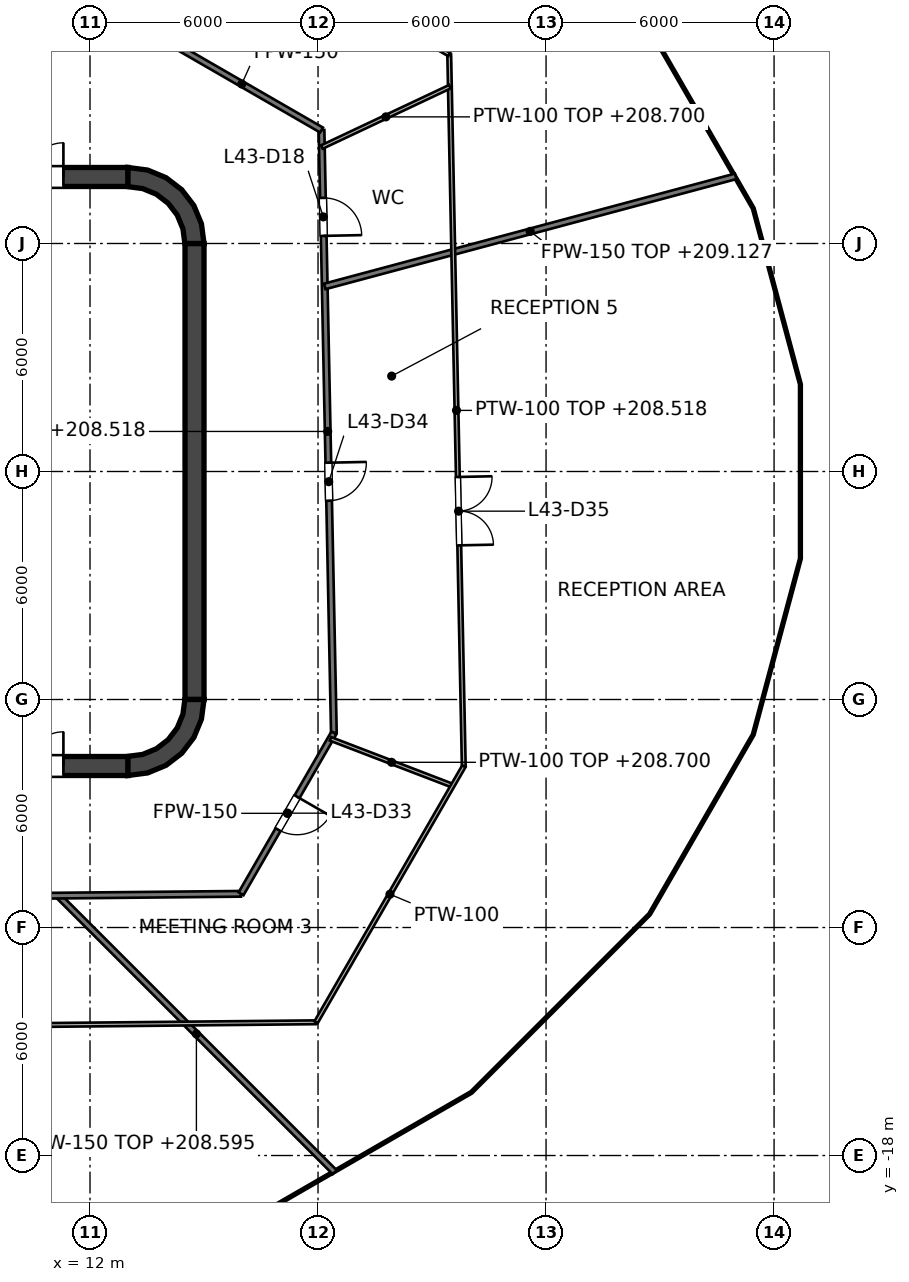
"""IFC4 building model, lengths in metres.
Left out: names, types, materials, properties, quantities, classifications, styles, units other than length and angle.
Written with IfcOpenShell. Run it as: python <this file> out.ifc"""

import sys

from ifc_helpers import new_model, si_unit, direction, frame, frame_2d, origin, place, context, subcontext, project, spatial, polyline, rectangle, outline, extrude, element, fill, save


model = new_model("IFC4")
c1 = context("Model", 3, precision=1e-05, world=origin(), true_north=direction((0.0, 1.0)))
c2 = subcontext(c1, "Body", "Model", "MODEL_VIEW")
j1 = project(units=[si_unit("LENGTHUNIT", "METRE"), si_unit("PLANEANGLEUNIT", "RADIAN")], contexts=[c1])
p1 = place(None, origin())
s1 = spatial("IfcSite", under=j1, at=p1, CompositionType="ELEMENT")
p2 = place(p1, origin())
s2 = spatial("IfcBuilding", under=s1, at=p2, CompositionType="ELEMENT")
p3 = place(p2, frame((0.0, 0.0, 203.0)))
s3 = spatial("IfcBuildingStorey", under=s2, at=p3, CompositionType="ELEMENT", Elevation=203.0)
p4 = place(p3, frame((-13.0, 7.75, 0.0), z_axis=(0.0, 0.0, 1.0), x_axis=(1.0, 0.0, 0.0)))
e1 = element("IfcWall", 1, at=p4, inside=s3, PredefinedType="SHEAR", context=c2, shape_type="SweptSolid", body=[
    extrude(rectangle(XDim=26.0, YDim=0.5, at=frame_2d((13.0, 0.0))), origin(), (0.0, 0.0, 1.0), 6.45),
])
p5 = place(p4, frame((1.7, 0.0, 0.0)))
e2 = element("IfcOpeningElement", 2, at=p5, cuts=e1, PredefinedType="OPENING", context=c2, shape_type="SweptSolid", body=[
    extrude(rectangle(XDim=1.8, YDim=2.1, at=frame_2d((0.9, 1.05))), frame((0.0, 0.25, 0.0), z_axis=(0.0, -1.0, 0.0), x_axis=(1.0, 0.0, 0.0)), (0.0, 0.0, 1.0), 0.5),
])
p6 = place(p4, frame((22.5, 0.0, 0.0)))
e3 = element("IfcOpeningElement", 3, at=p6, cuts=e1, PredefinedType="OPENING", context=c2, shape_type="SweptSolid", body=[
    extrude(rectangle(XDim=1.8, YDim=2.1, at=frame_2d((0.9, 1.05))), frame((0.0, 0.25, 0.0), z_axis=(0.0, -1.0, 0.0), x_axis=(1.0, 0.0, 0.0)), (0.0, 0.0, 1.0), 0.5),
])
p7 = place(p3, frame((-13.0, -7.75, 0.0), z_axis=(0.0, 0.0, 1.0), x_axis=(1.0, 0.0, 0.0)))
e4 = element("IfcWall", 4, at=p7, inside=s3, PredefinedType="SHEAR", context=c2, shape_type="SweptSolid", body=[
    extrude(rectangle(XDim=26.0, YDim=0.5, at=frame_2d((13.0, 0.0))), origin(), (0.0, 0.0, 1.0), 6.45),
])
p8 = place(p7, frame((1.7, 0.0, 0.0)))
e5 = element("IfcOpeningElement", 5, at=p8, cuts=e4, PredefinedType="OPENING", context=c2, shape_type="SweptSolid", body=[
    extrude(rectangle(XDim=1.8, YDim=2.1, at=frame_2d((0.9, 1.05))), frame((0.0, 0.25, 0.0), z_axis=(0.0, -1.0, 0.0), x_axis=(1.0, 0.0, 0.0)), (0.0, 0.0, 1.0), 0.5),
])
p9 = place(p7, frame((22.5, 0.0, 0.0)))
e6 = element("IfcOpeningElement", 6, at=p9, cuts=e4, PredefinedType="OPENING", context=c2, shape_type="SweptSolid", body=[
    extrude(rectangle(XDim=1.8, YDim=2.1, at=frame_2d((0.9, 1.05))), frame((0.0, 0.25, 0.0), z_axis=(0.0, -1.0, 0.0), x_axis=(1.0, 0.0, 0.0)), (0.0, 0.0, 1.0), 0.5),
])
p10 = place(p3, frame((14.75, -6.0, 0.0), z_axis=(0.0, 0.0, 1.0), x_axis=(0.0, 1.0, 0.0)))
e7 = element("IfcWall", 7, at=p10, inside=s3, PredefinedType="SHEAR", context=c2, shape_type="SweptSolid", body=[
    extrude(rectangle(XDim=12.0, YDim=0.5, at=frame_2d((6.0, 0.0))), origin(), (0.0, 0.0, 1.0), 6.45),
])
p11 = place(p3, origin())
e8 = element("IfcWall", 8, at=p11, inside=s3, PredefinedType="SHEAR", context=c2, shape_type="SweptSolid", body=[
    extrude(outline(polyline([(13.0, 8.0), (13.0, 7.496), (13.387, 7.445), (13.748, 7.295), (14.058, 7.058), (14.295, 6.748), (14.445, 6.387), (14.496, 6.0), (15.0, 6.0), (14.932, 6.518), (14.732, 7.0), (14.414, 7.414), (14.0, 7.732), (13.518, 7.932), (13.0, 8.0)])), origin(), (0.0, 0.0, 1.0), 6.45),
])
e9 = element("IfcWall", 9, at=p11, inside=s3, PredefinedType="SHEAR", context=c2, shape_type="SweptSolid", body=[
    extrude(outline(polyline([(15.0, -6.0), (14.496, -6.0), (14.445, -6.387), (14.295, -6.748), (14.058, -7.058), (13.748, -7.295), (13.387, -7.445), (13.0, -7.496), (13.0, -8.0), (13.518, -7.932), (14.0, -7.732), (14.414, -7.414), (14.732, -7.0), (14.932, -6.518), (15.0, -6.0)])), origin(), (0.0, 0.0, 1.0), 6.45),
])
p12 = place(p3, frame((11.8, -7.5, 0.0), z_axis=(0.0, 0.0, 1.0), x_axis=(0.0, 1.0, 0.0)))
e10 = element("IfcWall", 10, at=p12, inside=s3, PredefinedType="SOLIDWALL", context=c2, shape_type="SweptSolid", body=[
    extrude(rectangle(XDim=15.0, YDim=0.4, at=frame_2d((7.5, 0.0))), origin(), (0.0, 0.0, 1.0), 5.7),
])
p13 = place(p12, frame((11.3, 0.0, 0.0)))
e11 = element("IfcOpeningElement", 11, at=p13, cuts=e10, PredefinedType="OPENING", context=c2, shape_type="SweptSolid", body=[
    extrude(rectangle(XDim=1.1, YDim=2.1, at=frame_2d((0.55, 1.05))), frame((0.0, 0.2, 0.0), z_axis=(0.0, -1.0, 0.0), x_axis=(1.0, 0.0, 0.0)), (0.0, 0.0, 1.0), 0.4),
])
p14 = place(p12, frame((8.4, 0.0, 0.0)))
e12 = element("IfcOpeningElement", 12, at=p14, cuts=e10, PredefinedType="OPENING", context=c2, shape_type="SweptSolid", body=[
    extrude(rectangle(XDim=1.1, YDim=2.1, at=frame_2d((0.55, 1.05))), frame((0.0, 0.2, 0.0), z_axis=(0.0, -1.0, 0.0), x_axis=(1.0, 0.0, 0.0)), (0.0, 0.0, 1.0), 0.4),
])
p15 = place(p12, frame((5.5, 0.0, 0.0)))
e13 = element("IfcOpeningElement", 13, at=p15, cuts=e10, PredefinedType="OPENING", context=c2, shape_type="SweptSolid", body=[
    extrude(rectangle(XDim=1.1, YDim=2.1, at=frame_2d((0.55, 1.05))), frame((0.0, 0.2, 0.0), z_axis=(0.0, -1.0, 0.0), x_axis=(1.0, 0.0, 0.0)), (0.0, 0.0, 1.0), 0.4),
])
p16 = place(p12, frame((2.6, 0.0, 0.0)))
e14 = element("IfcOpeningElement", 14, at=p16, cuts=e10, PredefinedType="OPENING", context=c2, shape_type="SweptSolid", body=[
    extrude(rectangle(XDim=1.1, YDim=2.1, at=frame_2d((0.55, 1.05))), frame((0.0, 0.2, 0.0), z_axis=(0.0, -1.0, 0.0), x_axis=(1.0, 0.0, 0.0)), (0.0, 0.0, 1.0), 0.4),
])
p17 = place(p12, frame((13.697, 0.0, 0.0)))
e15 = element("IfcOpeningElement", 15, at=p17, cuts=e10, PredefinedType="OPENING", context=c2, shape_type="SweptSolid", body=[
    extrude(rectangle(XDim=0.9, YDim=2.1, at=frame_2d((0.45, 1.05))), frame((0.0, 0.2, 0.0), z_axis=(0.0, -1.0, 0.0), x_axis=(1.0, 0.0, 0.0)), (0.0, 0.0, 1.0), 0.4),
])
p18 = place(p12, frame((0.403, 0.0, 0.0)))
e16 = element("IfcOpeningElement", 16, at=p18, cuts=e10, PredefinedType="OPENING", context=c2, shape_type="SweptSolid", body=[
    extrude(rectangle(XDim=0.9, YDim=2.1, at=frame_2d((0.45, 1.05))), frame((0.0, 0.2, 0.0), z_axis=(0.0, -1.0, 0.0), x_axis=(1.0, 0.0, 0.0)), (0.0, 0.0, 1.0), 0.4),
])
e17 = element("IfcWall", 17, at=p11, inside=s3, PredefinedType="SOLIDWALL", context=c2, shape_type="SweptSolid", body=[
    extrude(outline(polyline([(12.0, -5.675), (12.0, -5.925), (14.25, -5.925), (14.5, -5.925), (14.5, -5.675), (14.5, -3.025), (14.5, -2.775), (14.5, -0.125), (14.5, 0.125), (14.5, 2.775), (14.5, 3.025), (14.5, 5.675), (14.5, 5.925), (14.25, 5.925), (12.0, 5.925), (12.0, 5.675), (14.25, 5.675), (14.25, 3.025), (12.0, 3.025), (12.0, 2.775), (14.25, 2.775), (14.25, 0.125), (12.0, 0.125), (12.0, -0.125), (14.25, -0.125), (14.25, -2.775), (12.0, -2.775), (12.0, -3.025), (14.25, -3.025), (14.25, -5.675), (12.0, -5.675)])), origin(), (0.0, 0.0, 1.0), 5.7),
])
p19 = place(p3, frame((18.092, 8.986, 0.0), z_axis=(0.0, 0.0, 1.0), x_axis=(0.020463865079, -0.999790593187, 0.0)))
e18 = element("IfcWall", 18, at=p19, inside=s3, PredefinedType="PARTITIONING", context=c2, shape_type="SweptSolid", body=[
    extrude(rectangle(XDim=15.867, YDim=0.15, at=frame_2d((7.934, 0.0))), origin(), (0.0, 0.0, 1.0), 5.518),
])
p20 = place(p19, frame((1.787, 0.0, 0.0)))
e19 = element("IfcOpeningElement", 19, at=p20, cuts=e18, PredefinedType="OPENING", context=c2, shape_type="SweptSolid", body=[
    extrude(rectangle(XDim=1.0, YDim=2.1, at=frame_2d((0.5, 1.05))), frame((0.0, 0.075, 0.0), z_axis=(0.0, -1.0, 0.0), x_axis=(1.0, 0.0, 0.0)), (0.0, 0.0, 1.0), 0.15),
])
p21 = place(p19, frame((8.756, 0.0, 0.0)))
e20 = element("IfcOpeningElement", 20, at=p21, cuts=e18, PredefinedType="OPENING", context=c2, shape_type="SweptSolid", body=[
    extrude(rectangle(XDim=1.0, YDim=2.1, at=frame_2d((0.5, 1.05))), frame((0.0, 0.075, 0.0), z_axis=(0.0, -1.0, 0.0), x_axis=(1.0, 0.0, 0.0)), (0.0, 0.0, 1.0), 0.15),
])
p22 = place(p3, frame((11.161, -11.161, 0.0), z_axis=(0.0, 0.0, 1.0), x_axis=(0.707106781187, -0.707106781187, 0.0)))
e21 = element("IfcWall", 21, at=p22, inside=s3, PredefinedType="PARTITIONING", context=c2, shape_type="SweptSolid", body=[
    extrude(rectangle(XDim=10.291, YDim=0.15, at=frame_2d((5.146, 0.0))), origin(), (0.0, 0.0, 1.0), 5.595),
])
p23 = place(p3, frame((13.895, 11.409, 0.0), z_axis=(0.0, 0.0, 1.0), x_axis=(0.866017793092, -0.500013181875, 0.0)))
e22 = element("IfcWall", 22, at=p23, inside=s3, PredefinedType="PARTITIONING", context=c2, shape_type="SweptSolid", body=[
    extrude(rectangle(XDim=4.846, YDim=0.15, at=frame_2d((2.423, 0.0))), origin(), (0.0, 0.0, 1.0), 5.527),
])
p24 = place(p3, frame((-13.66, -11.407, 0.0), z_axis=(0.0, 0.0, 1.0), x_axis=(0.999950890236, 0.009910454857, 0.0)))
e23 = element("IfcWall", 23, at=p24, inside=s3, PredefinedType="PARTITIONING", context=c2, shape_type="SweptSolid", body=[
    extrude(rectangle(XDim=29.635, YDim=0.15, at=frame_2d((14.818, 0.0))), origin(), (0.0, 0.0, 1.0), 5.527),
])
p25 = place(p24, frame((4.817, 0.0, 0.0)))
e24 = element("IfcOpeningElement", 24, at=p25, cuts=e23, PredefinedType="OPENING", context=c2, shape_type="SweptSolid", body=[
    extrude(rectangle(XDim=1.0, YDim=2.1, at=frame_2d((0.5, 1.05))), frame((0.0, 0.075, 0.0), z_axis=(0.0, -1.0, 0.0), x_axis=(1.0, 0.0, 0.0)), (0.0, 0.0, 1.0), 0.15),
])
p26 = place(p24, frame((14.217, 0.0, 0.0)))
e25 = element("IfcOpeningElement", 25, at=p26, cuts=e23, PredefinedType="OPENING", context=c2, shape_type="SweptSolid", body=[
    extrude(rectangle(XDim=1.0, YDim=2.1, at=frame_2d((0.5, 1.05))), frame((0.0, 0.075, 0.0), z_axis=(0.0, -1.0, 0.0), x_axis=(1.0, 0.0, 0.0)), (0.0, 0.0, 1.0), 0.15),
])
p27 = place(p24, frame((19.582, 0.0, 0.0)))
e26 = element("IfcOpeningElement", 26, at=p27, cuts=e23, PredefinedType="OPENING", context=c2, shape_type="SweptSolid", body=[
    extrude(rectangle(XDim=1.0, YDim=2.1, at=frame_2d((0.5, 1.05))), frame((0.0, 0.075, 0.0), z_axis=(0.0, -1.0, 0.0), x_axis=(1.0, 0.0, 0.0)), (0.0, 0.0, 1.0), 0.15),
])
p28 = place(p3, frame((-15.974, 11.113, 0.0), z_axis=(0.0, 0.0, 1.0), x_axis=(0.999950853314, 0.009914179568, 0.0)))
e27 = element("IfcWall", 27, at=p28, inside=s3, PredefinedType="PARTITIONING", context=c2, shape_type="SweptSolid", body=[
    extrude(rectangle(XDim=29.871, YDim=0.15, at=frame_2d((14.935, 0.0))), origin(), (0.0, 0.0, 1.0), 5.527),
])
p29 = place(p28, frame((23.655, 0.0, 0.0)))
e28 = element("IfcOpeningElement", 28, at=p29, cuts=e27, PredefinedType="OPENING", context=c2, shape_type="SweptSolid", body=[
    extrude(rectangle(XDim=1.0, YDim=2.1, at=frame_2d((0.5, 1.05))), frame((0.0, 0.075, 0.0), z_axis=(0.0, -1.0, 0.0), x_axis=(1.0, 0.0, 0.0)), (0.0, 0.0, 1.0), 0.15),
])
p30 = place(p28, frame((16.707, 0.0, 0.0)))
e29 = element("IfcOpeningElement", 29, at=p30, cuts=e27, PredefinedType="OPENING", context=c2, shape_type="SweptSolid", body=[
    extrude(rectangle(XDim=1.0, YDim=2.1, at=frame_2d((0.5, 1.05))), frame((0.0, 0.075, 0.0), z_axis=(0.0, -1.0, 0.0), x_axis=(1.0, 0.0, 0.0)), (0.0, 0.0, 1.0), 0.15),
])
p31 = place(p28, frame((13.027, 0.0, 0.0)))
e30 = element("IfcOpeningElement", 30, at=p31, cuts=e27, PredefinedType="OPENING", context=c2, shape_type="SweptSolid", body=[
    extrude(rectangle(XDim=1.0, YDim=2.1, at=frame_2d((0.5, 1.05))), frame((0.0, 0.075, 0.0), z_axis=(0.0, -1.0, 0.0), x_axis=(1.0, 0.0, 0.0)), (0.0, 0.0, 1.0), 0.15),
])
p32 = place(p28, frame((6.011, 0.0, 0.0)))
e31 = element("IfcOpeningElement", 31, at=p32, cuts=e27, PredefinedType="OPENING", context=c2, shape_type="SweptSolid", body=[
    extrude(rectangle(XDim=1.0, YDim=2.1, at=frame_2d((0.5, 1.05))), frame((0.0, 0.075, 0.0), z_axis=(0.0, -1.0, 0.0), x_axis=(1.0, 0.0, 0.0)), (0.0, 0.0, 1.0), 0.15),
])
p33 = place(p3, frame((18.177, 4.87, 0.0), z_axis=(0.0, 0.0, 1.0), x_axis=(0.965933448556, 0.258790596738, 0.0)))
e32 = element("IfcWall", 32, at=p33, inside=s3, PredefinedType="PARTITIONING", context=c2, shape_type="SweptSolid", body=[
    extrude(rectangle(XDim=11.193, YDim=0.15, at=frame_2d((5.597, 0.0))), origin(), (0.0, 0.0, 1.0), 6.127),
])
p34 = place(p3, frame((15.974, -11.113, 0.0), z_axis=(0.0, 0.0, 1.0), x_axis=(0.499795925742, 0.866143194057, 0.0)))
e33 = element("IfcWall", 33, at=p34, inside=s3, PredefinedType="PARTITIONING", context=c2, shape_type="SweptSolid", body=[
    extrude(rectangle(XDim=4.89, YDim=0.15, at=frame_2d((2.445, 0.0))), origin(), (0.0, 0.0, 1.0), 5.527),
])
p35 = place(p34, frame((1.95, 0.0, 0.0)))
e34 = element("IfcOpeningElement", 34, at=p35, cuts=e33, PredefinedType="OPENING", context=c2, shape_type="SweptSolid", body=[
    extrude(rectangle(XDim=1.0, YDim=2.1, at=frame_2d((0.5, 1.05))), frame((0.0, 0.075, 0.0), z_axis=(0.0, -1.0, 0.0), x_axis=(1.0, 0.0, 0.0)), (0.0, 0.0, 1.0), 0.15),
])
p36 = place(p3, frame((21.452, 10.972, 0.0), z_axis=(0.0, 0.0, 1.0), x_axis=(0.020449379556, -0.999790889574, 0.0)))
e35 = element("IfcWall", 35, at=p36, inside=s3, PredefinedType="PARTITIONING", context=c2, shape_type="SweptSolid", body=[
    extrude(rectangle(XDim=18.732, YDim=0.1, at=frame_2d((9.366, 0.0))), origin(), (0.0, 0.0, 1.0), 5.518),
])
p37 = place(p36, frame((11.118, 0.0, 0.0)))
e36 = element("IfcOpeningElement", 36, at=p37, cuts=e35, PredefinedType="OPENING", context=c2, shape_type="SweptSolid", body=[
    extrude(rectangle(XDim=1.8, YDim=2.1, at=frame_2d((0.9, 1.05))), frame((0.0, 0.05, 0.0), z_axis=(0.0, -1.0, 0.0), x_axis=(1.0, 0.0, 0.0)), (0.0, 0.0, 1.0), 0.1),
])
p38 = place(p3, frame((14.79, 14.818, 0.0), z_axis=(0.0, 0.0, 1.0), x_axis=(0.866027558591, -0.499996267748, 0.0)))
e37 = element("IfcWall", 37, at=p38, inside=s3, PredefinedType="PARTITIONING", context=c2, shape_type="SweptSolid", body=[
    extrude(rectangle(XDim=7.692, YDim=0.1, at=frame_2d((3.846, 0.0))), origin(), (0.0, 0.0, 1.0), 5.527),
])
p39 = place(p3, frame((18.328, -7.036, 0.0), z_axis=(0.0, 0.0, 1.0), x_axis=(0.933641391497, -0.358209089894, 0.0)))
e38 = element("IfcWall", 38, at=p39, inside=s3, PredefinedType="PARTITIONING", context=c2, shape_type="SweptSolid", body=[
    extrude(rectangle(XDim=3.443, YDim=0.1, at=frame_2d((1.721, 0.0))), origin(), (0.0, 0.0, 1.0), 5.7),
])
p40 = place(p3, frame((-14.32, -14.814, 0.0), z_axis=(0.0, 0.0, 1.0), x_axis=(0.999950809916, 0.009918555737, 0.0)))
e39 = element("IfcWall", 39, at=p40, inside=s3, PredefinedType="PARTITIONING", context=c2, shape_type="SweptSolid", body=[
    extrude(rectangle(XDim=32.27, YDim=0.1, at=frame_2d((16.135, 0.0))), origin(), (0.0, 0.0, 1.0), 5.527),
])
p41 = place(p40, frame((4.239, 0.0, 0.0)))
e40 = element("IfcOpeningElement", 40, at=p41, cuts=e39, PredefinedType="OPENING", context=c2, shape_type="SweptSolid", body=[
    extrude(rectangle(XDim=1.8, YDim=2.1, at=frame_2d((0.9, 1.05))), frame((0.0, 0.05, 0.0), z_axis=(0.0, -1.0, 0.0), x_axis=(1.0, 0.0, 0.0)), (0.0, 0.0, 1.0), 0.1),
])
p42 = place(p40, frame((21.845, 0.0, 0.0)))
e41 = element("IfcOpeningElement", 41, at=p42, cuts=e39, PredefinedType="OPENING", context=c2, shape_type="SweptSolid", body=[
    extrude(rectangle(XDim=1.8, YDim=2.1, at=frame_2d((0.9, 1.05))), frame((0.0, 0.05, 0.0), z_axis=(0.0, -1.0, 0.0), x_axis=(1.0, 0.0, 0.0)), (0.0, 0.0, 1.0), 0.1),
])
p43 = place(p3, frame((18.101, 8.538, 0.0), z_axis=(0.0, 0.0, 1.0), x_axis=(0.904509384474, 0.426453717769, 0.0)))
e42 = element("IfcWall", 42, at=p43, inside=s3, PredefinedType="PARTITIONING", context=c2, shape_type="SweptSolid", body=[
    extrude(rectangle(XDim=3.723, YDim=0.1, at=frame_2d((1.862, 0.0))), origin(), (0.0, 0.0, 1.0), 5.7),
])
p44 = place(p3, frame((17.948, -14.494, 0.0), z_axis=(0.0, 0.0, 1.0), x_axis=(0.49994610202, 0.866056519561, 0.0)))
e43 = element("IfcWall", 43, at=p44, inside=s3, PredefinedType="PARTITIONING", context=c2, shape_type="SweptSolid", body=[
    extrude(rectangle(XDim=7.78, YDim=0.1, at=frame_2d((3.89, 0.0))), origin(), (0.0, 0.0, 1.0), 5.527),
])
p45 = place(p13, origin())
e44 = element("IfcDoor", 44, at=p45, inside=s3, OperationType="DOUBLE_DOOR_SLIDING", PredefinedType="DOOR", context=c2, shape_type="SweptSolid", body=[
    extrude(rectangle(XDim=1.1, YDim=2.1, at=frame_2d((0.55, 1.05))), frame((0.0, 0.025, 0.0), z_axis=(0.0, -1.0, 0.0), x_axis=(1.0, 0.0, 0.0)), (0.0, 0.0, 1.0), 0.05),
])
fill(e11, e44)
p46 = place(p14, origin())
e45 = element("IfcDoor", 45, at=p46, inside=s3, OperationType="DOUBLE_DOOR_SLIDING", PredefinedType="DOOR", context=c2, shape_type="SweptSolid", body=[
    extrude(rectangle(XDim=1.1, YDim=2.1, at=frame_2d((0.55, 1.05))), frame((0.0, 0.025, 0.0), z_axis=(0.0, -1.0, 0.0), x_axis=(1.0, 0.0, 0.0)), (0.0, 0.0, 1.0), 0.05),
])
fill(e12, e45)
p47 = place(p15, origin())
e46 = element("IfcDoor", 46, at=p47, inside=s3, OperationType="DOUBLE_DOOR_SLIDING", PredefinedType="DOOR", context=c2, shape_type="SweptSolid", body=[
    extrude(rectangle(XDim=1.1, YDim=2.1, at=frame_2d((0.55, 1.05))), frame((0.0, 0.025, 0.0), z_axis=(0.0, -1.0, 0.0), x_axis=(1.0, 0.0, 0.0)), (0.0, 0.0, 1.0), 0.05),
])
fill(e13, e46)
p48 = place(p16, origin())
e47 = element("IfcDoor", 47, at=p48, inside=s3, OperationType="DOUBLE_DOOR_SLIDING", PredefinedType="DOOR", context=c2, shape_type="SweptSolid", body=[
    extrude(rectangle(XDim=1.1, YDim=2.1, at=frame_2d((0.55, 1.05))), frame((0.0, 0.025, 0.0), z_axis=(0.0, -1.0, 0.0), x_axis=(1.0, 0.0, 0.0)), (0.0, 0.0, 1.0), 0.05),
])
fill(e14, e47)
p49 = place(p17, origin())
e48 = element("IfcDoor", 48, at=p49, inside=s3, OperationType="SINGLE_SWING_RIGHT", PredefinedType="DOOR", context=c2, shape_type="SweptSolid", body=[
    extrude(rectangle(XDim=0.9, YDim=2.1, at=frame_2d((0.45, 1.05))), frame((0.0, 0.025, 0.0), z_axis=(0.0, -1.0, 0.0), x_axis=(1.0, 0.0, 0.0)), (0.0, 0.0, 1.0), 0.05),
])
fill(e15, e48)
p50 = place(p18, origin())
e49 = element("IfcDoor", 49, at=p50, inside=s3, OperationType="SINGLE_SWING_RIGHT", PredefinedType="DOOR", context=c2, shape_type="SweptSolid", body=[
    extrude(rectangle(XDim=0.9, YDim=2.1, at=frame_2d((0.45, 1.05))), frame((0.0, 0.025, 0.0), z_axis=(0.0, -1.0, 0.0), x_axis=(1.0, 0.0, 0.0)), (0.0, 0.0, 1.0), 0.05),
])
fill(e16, e49)
p51 = place(p6, origin())
e50 = element("IfcDoor", 50, at=p51, inside=s3, OperationType="DOUBLE_DOOR_SINGLE_SWING", PredefinedType="DOOR", context=c2, shape_type="SweptSolid", body=[
    extrude(rectangle(XDim=1.8, YDim=2.1, at=frame_2d((0.9, 1.05))), frame((0.0, 0.025, 0.0), z_axis=(0.0, -1.0, 0.0), x_axis=(1.0, 0.0, 0.0)), (0.0, 0.0, 1.0), 0.05),
])
fill(e3, e50)
p52 = place(p9, origin())
e51 = element("IfcDoor", 51, at=p52, inside=s3, OperationType="DOUBLE_DOOR_SINGLE_SWING", PredefinedType="DOOR", context=c2, shape_type="SweptSolid", body=[
    extrude(rectangle(XDim=1.8, YDim=2.1, at=frame_2d((0.9, 1.05))), frame((0.0, 0.025, 0.0), z_axis=(0.0, -1.0, 0.0), x_axis=(1.0, 0.0, 0.0)), (0.0, 0.0, 1.0), 0.05),
])
fill(e6, e51)
p53 = place(p20, origin())
e52 = element("IfcDoor", 52, at=p53, inside=s3, OperationType="SINGLE_SWING_RIGHT", PredefinedType="DOOR", context=c2, shape_type="SweptSolid", body=[
    extrude(rectangle(XDim=1.0, YDim=2.1, at=frame_2d((0.5, 1.05))), frame((0.0, 0.025, 0.0), z_axis=(0.0, -1.0, 0.0), x_axis=(1.0, 0.0, 0.0)), (0.0, 0.0, 1.0), 0.05),
])
fill(e19, e52)
p54 = place(p35, origin())
e53 = element("IfcDoor", 53, at=p54, inside=s3, OperationType="SINGLE_SWING_RIGHT", PredefinedType="DOOR", context=c2, shape_type="SweptSolid", body=[
    extrude(rectangle(XDim=1.0, YDim=2.1, at=frame_2d((0.5, 1.05))), frame((0.0, 0.025, 0.0), z_axis=(0.0, -1.0, 0.0), x_axis=(1.0, 0.0, 0.0)), (0.0, 0.0, 1.0), 0.05),
])
fill(e34, e53)
p55 = place(p21, origin())
e54 = element("IfcDoor", 54, at=p55, inside=s3, OperationType="SINGLE_SWING_LEFT", PredefinedType="DOOR", context=c2, shape_type="SweptSolid", body=[
    extrude(rectangle(XDim=1.0, YDim=2.1, at=frame_2d((0.5, 1.05))), frame((0.0, 0.025, 0.0), z_axis=(0.0, -1.0, 0.0), x_axis=(1.0, 0.0, 0.0)), (0.0, 0.0, 1.0), 0.05),
])
fill(e20, e54)
p56 = place(p37, origin())
e55 = element("IfcDoor", 55, at=p56, inside=s3, OperationType="DOUBLE_DOOR_SINGLE_SWING", PredefinedType="DOOR", context=c2, shape_type="SweptSolid", body=[
    extrude(rectangle(XDim=1.8, YDim=2.1, at=frame_2d((0.9, 1.05))), frame((0.0, 0.025, 0.0), z_axis=(0.0, -1.0, 0.0), x_axis=(1.0, 0.0, 0.0)), (0.0, 0.0, 1.0), 0.05),
])
fill(e36, e55)
save(model, sys.argv[1])
